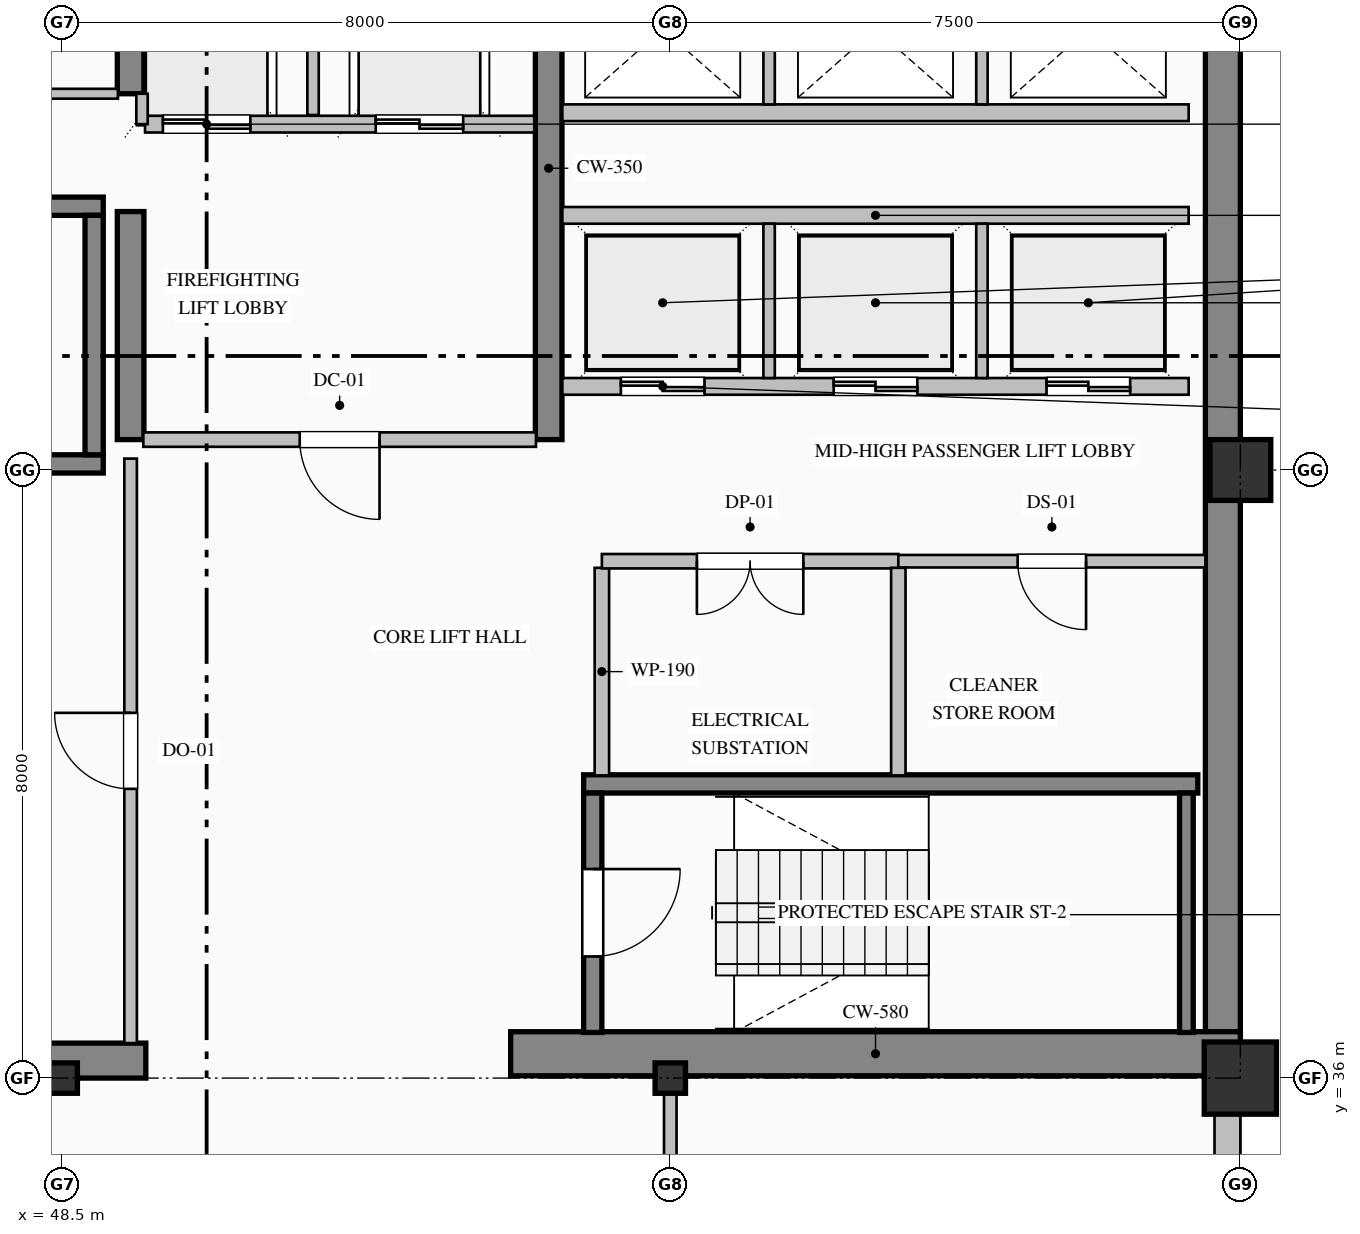
"""IFC4 building model, lengths in metres.
Left out: names, types, materials, properties, quantities, classifications, styles, units other than length and angle.
Written with IfcOpenShell. Run it as: python <this file> out.ifc"""

import sys

from ifc_helpers import new_model, si_unit, direction, frame, frame_2d, origin, origin_2d, place, context, subcontext, project, spatial, rectangle, hollow_rectangle, i_section, extrude, element, fill, save


model = new_model("IFC4")
c1 = context("Model", 3, precision=1e-05, world=origin(), true_north=direction((0.0, 1.0)))
c2 = subcontext(c1, "Body", "Model", "MODEL_VIEW")
j1 = project(units=[si_unit("LENGTHUNIT", "METRE"), si_unit("PLANEANGLEUNIT", "RADIAN")], contexts=[c1])
p1 = place(None, origin())
s1 = spatial("IfcSite", under=j1, at=p1, CompositionType="ELEMENT")
p2 = place(p1, origin())
s2 = spatial("IfcBuilding", under=s1, at=p2, CompositionType="ELEMENT")
p3 = place(p2, frame((0.0, 0.0, 265.8)))
s3 = spatial("IfcBuildingStorey", under=s2, at=p3, CompositionType="ELEMENT", Elevation=265.8)
p4 = place(p3, frame((63.77, 36.32, 0.0), z_axis=(0.0, 0.0, 1.0), x_axis=(0.0, 1.0, 0.0)))
e1 = element("IfcWall", 1, at=p4, inside=s3, PredefinedType="SHEAR", context=c2, shape_type="SweptSolid", body=[
    extrude(rectangle(XDim=15.22, YDim=0.46, at=frame_2d((7.61, 0.0))), origin(), (0.0, 0.0, 1.0), 3.775),
])
p5 = place(p3, frame((40.5, 36.23, 0.0), z_axis=(0.0, 0.0, 1.0), x_axis=(1.0, 0.0, 0.0)))
e2 = element("IfcWall", 2, at=p5, inside=s3, PredefinedType="SHEAR", context=c2, shape_type="SweptSolid", body=[
    extrude(rectangle(XDim=9.1, YDim=0.46, at=frame_2d((4.55, 0.0))), origin(), (0.0, 0.0, 1.0), 3.775),
])
p6 = place(p3, frame((54.4, 36.32, 0.0), z_axis=(0.0, 0.0, 1.0), x_axis=(1.0, 0.0, 0.0)))
e3 = element("IfcWall", 3, at=p6, inside=s3, PredefinedType="SHEAR", context=c2, shape_type="SweptSolid", body=[
    extrude(rectangle(XDim=9.6, YDim=0.58, at=frame_2d((4.8, 0.0))), origin(), (0.0, 0.0, 1.0), 4.0),
])
p7 = place(p3, frame((49.4, 44.4, 0.0), z_axis=(0.0, 0.0, 1.0), x_axis=(0.0, 1.0, 0.0)))
e4 = element("IfcWall", 4, at=p7, inside=s3, PredefinedType="SHEAR", context=c2, shape_type="SweptSolid", body=[
    extrude(rectangle(XDim=3.0, YDim=0.35, at=frame_2d((1.5, 0.0))), origin(), (0.0, 0.0, 1.0), 3.775),
])
p8 = place(p3, frame((49.4, 48.95, 0.0), z_axis=(0.0, 0.0, 1.0), x_axis=(0.0, 1.0, 0.0)))
e5 = element("IfcWall", 5, at=p8, inside=s3, PredefinedType="SHEAR", context=c2, shape_type="SweptSolid", body=[
    extrude(rectangle(XDim=2.59, YDim=0.35, at=frame_2d((1.295, 0.0))), origin(), (0.0, 0.0, 1.0), 3.775),
])
p9 = place(p3, frame((54.9, 44.4, 0.0), z_axis=(0.0, 0.0, 1.0), x_axis=(0.0, 1.0, 0.0)))
e6 = element("IfcWall", 6, at=p9, inside=s3, PredefinedType="SHEAR", context=c2, shape_type="SweptSolid", body=[
    extrude(rectangle(XDim=7.14, YDim=0.35, at=frame_2d((3.57, 0.0))), origin(), (0.0, 0.0, 1.0), 3.775),
])
for number, where, z_axis, x_axis in (
    (7, (48.5, 36.0, 0.0), (0.0, 0.0, 1.0), (1.0, 0.0, 0.0)),
    (8, (56.5, 36.0, 0.0), (0.0, 0.0, 1.0), (1.0, 0.0, 0.0)),
):
    element("IfcColumn", number, at=place(p3, frame(where, z_axis=z_axis, x_axis=x_axis)), inside=s3, PredefinedType="COLUMN", context=c2, shape_type="SweptSolid", body=[
        extrude(i_section(OverallWidth=0.4, OverallDepth=0.4, WebThickness=0.013, FlangeThickness=0.021, FilletRadius=0.022, at=origin_2d()), origin(), (0.0, 0.0, 1.0), 4.0),
    ])
p10 = place(p3, frame((64.0, 36.0, 0.0), z_axis=(0.0, 0.0, 1.0), x_axis=(1.0, 0.0, 0.0)))
e9 = element("IfcColumn", 9, at=p10, inside=s3, PredefinedType="COLUMN", context=c2, shape_type="SweptSolid", body=[
    extrude(hollow_rectangle(XDim=0.95, YDim=0.95, WallThickness=0.036, at=origin_2d()), origin(), (0.0, 0.0, 1.0), 4.0),
])
p11 = place(p3, frame((64.0, 44.0, 0.0), z_axis=(0.0, 0.0, 1.0), x_axis=(1.0, 0.0, 0.0)))
e10 = element("IfcColumn", 10, at=p11, inside=s3, PredefinedType="COLUMN", context=c2, shape_type="SweptSolid", body=[
    extrude(hollow_rectangle(XDim=0.8, YDim=0.8, WallThickness=0.032, at=origin_2d()), origin(), (0.0, 0.0, 1.0), 4.0),
])
p12 = place(p3, frame((63.83, 36.05, 0.0), z_axis=(0.0, 0.0, 1.0), x_axis=(0.0, -1.0, 0.0)))
e11 = element("IfcWall", 11, at=p12, inside=s3, PredefinedType="SOLIDWALL", context=c2, shape_type="SweptSolid", body=[
    extrude(rectangle(XDim=19.55, YDim=0.34, at=frame_2d((9.775, 0.0))), origin(), (0.0, 0.0, 1.0), 3.325),
])
p13 = place(p12, frame((2.925, 0.0, 0.9)))
e12 = element("IfcOpeningElement", 12, at=p13, cuts=e11, PredefinedType="OPENING", context=c2, shape_type="SweptSolid", body=[
    extrude(rectangle(XDim=1.35, YDim=1.85, at=frame_2d((0.675, 0.925))), frame((0.0, 0.18, 0.0), z_axis=(0.0, -1.0, 0.0), x_axis=(1.0, 0.0, 0.0)), (0.0, 0.0, 1.0), 0.36),
])
p14 = place(p12, frame((10.2, 0.0, 0.9)))
e13 = element("IfcOpeningElement", 13, at=p14, cuts=e11, PredefinedType="OPENING", context=c2, shape_type="SweptSolid", body=[
    extrude(rectangle(XDim=1.2, YDim=1.85, at=frame_2d((0.6, 0.925))), frame((0.0, 0.18, 0.0), z_axis=(0.0, -1.0, 0.0), x_axis=(1.0, 0.0, 0.0)), (0.0, 0.0, 1.0), 0.36),
])
p15 = place(p12, frame((13.725, 0.0, 0.9)))
e14 = element("IfcOpeningElement", 14, at=p15, cuts=e11, PredefinedType="OPENING", context=c2, shape_type="SweptSolid", body=[
    extrude(rectangle(XDim=1.35, YDim=1.85, at=frame_2d((0.675, 0.925))), frame((0.0, 0.18, 0.0), z_axis=(0.0, -1.0, 0.0), x_axis=(1.0, 0.0, 0.0)), (0.0, 0.0, 1.0), 0.36),
])
for number, where, z_axis, x_axis in (
    (15, (40.96, 47.47, 0.0), (0.0, 0.0, 1.0), (1.0, 0.0, 0.0)),
    (16, (49.04, 44.08, 0.0), (0.0, 0.0, 1.0), (-1.0, 0.0, 0.0)),
):
    element("IfcWall", number, at=place(p3, frame(where, z_axis=z_axis, x_axis=x_axis)), inside=s3, PredefinedType="SOLIDWALL", context=c2, shape_type="SweptSolid", body=[
        extrude(rectangle(XDim=8.08, YDim=0.24, at=frame_2d((4.04, 0.0))), origin(), (0.0, 0.0, 1.0), 4.0),
    ])
p16 = place(p3, frame((48.92, 44.2, 0.0), z_axis=(0.0, 0.0, 1.0), x_axis=(0.0, 1.0, 0.0)))
e17 = element("IfcWall", 17, at=p16, inside=s3, PredefinedType="SOLIDWALL", context=c2, shape_type="SweptSolid", body=[
    extrude(rectangle(XDim=3.15, YDim=0.24, at=frame_2d((1.575, 0.0))), origin(), (0.0, 0.0, 1.0), 4.0),
])
p17 = place(p3, frame((55.36, 39.87, 0.0), z_axis=(0.0, 0.0, 1.0), x_axis=(1.0, 0.0, 0.0)))
e18 = element("IfcWall", 18, at=p17, inside=s3, PredefinedType="SOLIDWALL", context=c2, shape_type="SweptSolid", body=[
    extrude(rectangle(XDim=8.08, YDim=0.24, at=frame_2d((4.04, 0.0))), origin(), (0.0, 0.0, 1.0), 4.0),
])
p18 = place(p3, frame((55.48, 39.75, 0.0), z_axis=(0.0, 0.0, 1.0), x_axis=(0.0, -1.0, 0.0)))
e19 = element("IfcWall", 19, at=p18, inside=s3, PredefinedType="SOLIDWALL", context=c2, shape_type="SweptSolid", body=[
    extrude(rectangle(XDim=3.15, YDim=0.24, at=frame_2d((1.575, 0.0))), origin(), (0.0, 0.0, 1.0), 4.0),
])
p19 = place(p18, frame((1.0, 0.0, 0.0)))
e20 = element("IfcOpeningElement", 20, at=p19, cuts=e19, PredefinedType="OPENING", context=c2, shape_type="SweptSolid", body=[
    extrude(rectangle(XDim=1.15, YDim=2.2, at=frame_2d((0.575, 1.1))), frame((0.0, 0.13, 0.0), z_axis=(0.0, -1.0, 0.0), x_axis=(1.0, 0.0, 0.0)), (0.0, 0.0, 1.0), 0.26),
])
p20 = place(p3, frame((63.29, 36.6, 0.0), z_axis=(0.0, 0.0, 1.0), x_axis=(0.0, 1.0, 0.0)))
e21 = element("IfcWall", 21, at=p20, inside=s3, PredefinedType="SOLIDWALL", context=c2, shape_type="SweptSolid", body=[
    extrude(rectangle(XDim=3.15, YDim=0.18, at=frame_2d((1.575, 0.0))), origin(), (0.0, 0.0, 1.0), 4.0),
])
p21 = place(p3, frame((54.71, 48.55, 0.0), z_axis=(0.0, 0.0, 1.0), x_axis=(-1.0, 0.0, 0.0)))
e22 = element("IfcWall", 22, at=p21, inside=s3, PredefinedType="PARTITIONING", context=c2, shape_type="SweptSolid", body=[
    extrude(rectangle(XDim=5.12, YDim=0.22, at=frame_2d((2.56, 0.0))), origin(), (0.0, 0.0, 1.0), 3.775),
])
p22 = place(p21, frame((3.735, 0.0, 0.0)))
e23 = element("IfcOpeningElement", 23, at=p22, cuts=e22, PredefinedType="OPENING", context=c2, shape_type="SweptSolid", body=[
    extrude(rectangle(XDim=1.15, YDim=2.2, at=frame_2d((0.575, 1.1))), frame((0.0, 0.12, 0.0), z_axis=(0.0, -1.0, 0.0), x_axis=(1.0, 0.0, 0.0)), (0.0, 0.0, 1.0), 0.24),
])
p23 = place(p21, frame((0.935, 0.0, 0.0)))
e24 = element("IfcOpeningElement", 24, at=p23, cuts=e22, PredefinedType="OPENING", context=c2, shape_type="SweptSolid", body=[
    extrude(rectangle(XDim=1.15, YDim=2.2, at=frame_2d((0.575, 1.1))), frame((0.0, 0.12, 0.0), z_axis=(0.0, -1.0, 0.0), x_axis=(1.0, 0.0, 0.0)), (0.0, 0.0, 1.0), 0.24),
])
p24 = place(p3, frame((51.8, 48.67, 0.0), z_axis=(0.0, 0.0, 1.0), x_axis=(0.0, 1.0, 0.0)))
e25 = element("IfcWall", 25, at=p24, inside=s3, PredefinedType="PARTITIONING", context=c2, shape_type="SweptSolid", body=[
    extrude(rectangle(XDim=2.87, YDim=0.15, at=frame_2d((1.435, 0.0))), origin(), (0.0, 0.0, 1.0), 3.775),
])
p25 = place(p3, frame((49.55, 48.55, 0.0), z_axis=(0.0, 0.0, 1.0), x_axis=(0.0, 1.0, 0.0)))
e26 = element("IfcWall", 26, at=p25, inside=s3, PredefinedType="PARTITIONING", context=c2, shape_type="SweptSolid", body=[
    extrude(rectangle(XDim=0.4, YDim=0.15, at=frame_2d((0.2, 0.0))), origin(), (0.0, 0.0, 1.0), 3.775),
])
p26 = place(p3, frame((63.32, 45.1, 0.0), z_axis=(0.0, 0.0, 1.0), x_axis=(-1.0, 0.0, 0.0)))
e27 = element("IfcWall", 27, at=p26, inside=s3, PredefinedType="PARTITIONING", context=c2, shape_type="SweptSolid", body=[
    extrude(rectangle(XDim=8.24, YDim=0.22, at=frame_2d((4.12, 0.0))), origin(), (0.0, 0.0, 1.0), 3.775),
])
p27 = place(p26, frame((6.37, 0.0, 0.0)))
e28 = element("IfcOpeningElement", 28, at=p27, cuts=e27, PredefinedType="OPENING", context=c2, shape_type="SweptSolid", body=[
    extrude(rectangle(XDim=1.1, YDim=2.2, at=frame_2d((0.55, 1.1))), frame((0.0, 0.12, 0.0), z_axis=(0.0, -1.0, 0.0), x_axis=(1.0, 0.0, 0.0)), (0.0, 0.0, 1.0), 0.24),
])
p28 = place(p26, frame((3.57, 0.0, 0.0)))
e29 = element("IfcOpeningElement", 29, at=p28, cuts=e27, PredefinedType="OPENING", context=c2, shape_type="SweptSolid", body=[
    extrude(rectangle(XDim=1.1, YDim=2.2, at=frame_2d((0.55, 1.1))), frame((0.0, 0.12, 0.0), z_axis=(0.0, -1.0, 0.0), x_axis=(1.0, 0.0, 0.0)), (0.0, 0.0, 1.0), 0.24),
])
p29 = place(p26, frame((0.77, 0.0, 0.0)))
e30 = element("IfcOpeningElement", 30, at=p29, cuts=e27, PredefinedType="OPENING", context=c2, shape_type="SweptSolid", body=[
    extrude(rectangle(XDim=1.1, YDim=2.2, at=frame_2d((0.55, 1.1))), frame((0.0, 0.12, 0.0), z_axis=(0.0, -1.0, 0.0), x_axis=(1.0, 0.0, 0.0)), (0.0, 0.0, 1.0), 0.24),
])
p30 = place(p3, frame((55.08, 47.35, 0.0), z_axis=(0.0, 0.0, 1.0), x_axis=(1.0, 0.0, 0.0)))
e31 = element("IfcWall", 31, at=p30, inside=s3, PredefinedType="PARTITIONING", context=c2, shape_type="SweptSolid", body=[
    extrude(rectangle(XDim=8.24, YDim=0.22, at=frame_2d((4.12, 0.0))), origin(), (0.0, 0.0, 1.0), 3.775),
])
for number, where, z_axis, x_axis in (
    (32, (57.8, 45.21, 0.0), (0.0, 0.0, 1.0), (0.0, 1.0, 0.0)),
    (33, (60.6, 45.21, 0.0), (0.0, 0.0, 1.0), (0.0, 1.0, 0.0)),
):
    element("IfcWall", number, at=place(p3, frame(where, z_axis=z_axis, x_axis=x_axis)), inside=s3, PredefinedType="PARTITIONING", context=c2, shape_type="SweptSolid", body=[
        extrude(rectangle(XDim=2.03, YDim=0.15, at=frame_2d((1.015, 0.0))), origin(), (0.0, 0.0, 1.0), 3.775),
    ])
p31 = place(p3, frame((63.32, 48.7, 0.0), z_axis=(0.0, 0.0, 1.0), x_axis=(-1.0, 0.0, 0.0)))
e34 = element("IfcWall", 34, at=p31, inside=s3, PredefinedType="PARTITIONING", context=c2, shape_type="SweptSolid", body=[
    extrude(rectangle(XDim=8.24, YDim=0.22, at=frame_2d((4.12, 0.0))), origin(), (0.0, 0.0, 1.0), 3.775),
])
for number, where, z_axis, x_axis in (
    (35, (57.8, 48.81, 0.0), (0.0, 0.0, 1.0), (0.0, 1.0, 0.0)),
    (36, (60.6, 48.81, 0.0), (0.0, 0.0, 1.0), (0.0, 1.0, 0.0)),
):
    element("IfcWall", number, at=place(p3, frame(where, z_axis=z_axis, x_axis=x_axis)), inside=s3, PredefinedType="PARTITIONING", context=c2, shape_type="SweptSolid", body=[
        extrude(rectangle(XDim=2.73, YDim=0.15, at=frame_2d((1.365, 0.0))), origin(), (0.0, 0.0, 1.0), 3.775),
    ])
p32 = place(p3, frame((45.2, 48.95, 0.0), z_axis=(0.0, 0.0, 1.0), x_axis=(1.0, 0.0, 0.0)))
e37 = element("IfcWall", 37, at=p32, inside=s3, PredefinedType="PARTITIONING", context=c2, shape_type="SweptSolid", body=[
    extrude(rectangle(XDim=4.033, YDim=0.13, at=frame_2d((2.017, 0.0))), origin(), (0.0, 0.0, 1.0), 3.775),
])
p33 = place(p32, frame((1.556, 0.0, 0.0)))
e38 = element("IfcOpeningElement", 38, at=p33, cuts=e37, PredefinedType="OPENING", context=c2, shape_type="SweptSolid", body=[
    extrude(rectangle(XDim=0.92, YDim=2.15, at=frame_2d((0.46, 1.075))), frame((0.0, 0.075, 0.0), z_axis=(0.0, -1.0, 0.0), x_axis=(1.0, 0.0, 0.0)), (0.0, 0.0, 1.0), 0.15),
])
p34 = place(p3, frame((54.733, 44.4, 0.0), z_axis=(0.0, 0.0, 1.0), x_axis=(-1.0, 0.0, 0.0)))
e39 = element("IfcWall", 39, at=p34, inside=s3, PredefinedType="PARTITIONING", context=c2, shape_type="SweptSolid", body=[
    extrude(rectangle(XDim=5.166, YDim=0.19, at=frame_2d((2.583, 0.0))), origin(), (0.0, 0.0, 1.0), 3.775),
])
p35 = place(p34, frame((2.058, 0.0, 0.0)))
e40 = element("IfcOpeningElement", 40, at=p35, cuts=e39, PredefinedType="OPENING", context=c2, shape_type="SweptSolid", body=[
    extrude(rectangle(XDim=1.05, YDim=2.15, at=frame_2d((0.525, 1.075))), frame((0.0, 0.105, 0.0), z_axis=(0.0, -1.0, 0.0), x_axis=(1.0, 0.0, 0.0)), (0.0, 0.0, 1.0), 0.21),
])
p36 = place(p3, frame((49.4, 36.46, 0.0), z_axis=(0.0, 0.0, 1.0), x_axis=(0.0, 1.0, 0.0)))
e41 = element("IfcWall", 41, at=p36, inside=s3, PredefinedType="PARTITIONING", context=c2, shape_type="SweptSolid", body=[
    extrude(rectangle(XDim=7.69, YDim=0.165, at=frame_2d((3.845, 0.0))), origin(), (0.0, 0.0, 1.0), 3.017),
])
p37 = place(p36, frame((3.345, 0.0, 0.0)))
e42 = element("IfcOpeningElement", 42, at=p37, cuts=e41, PredefinedType="OPENING", context=c2, shape_type="SweptSolid", body=[
    extrude(rectangle(XDim=1.0, YDim=2.15, at=frame_2d((0.5, 1.075))), frame((0.0, 0.093, 0.0), z_axis=(0.0, -1.0, 0.0), x_axis=(1.0, 0.0, 0.0)), (0.0, 0.0, 1.0), 0.185),
])
p38 = place(p3, frame((55.6, 42.713, 0.0), z_axis=(0.0, 0.0, 1.0), x_axis=(0.0, -1.0, 0.0)))
e43 = element("IfcWall", 43, at=p38, inside=s3, PredefinedType="PARTITIONING", context=c2, shape_type="SweptSolid", body=[
    extrude(rectangle(XDim=2.731, YDim=0.19, at=frame_2d((1.365, 0.0))), origin(), (0.0, 0.0, 1.0), 3.775),
])
p39 = place(p3, frame((59.5, 42.8, 0.0), z_axis=(0.0, 0.0, 1.0), x_axis=(-1.0, 0.0, 0.0)))
e44 = element("IfcWall", 44, at=p39, inside=s3, PredefinedType="PARTITIONING", context=c2, shape_type="SweptSolid", body=[
    extrude(rectangle(XDim=3.9, YDim=0.19, at=frame_2d((1.95, 0.0))), origin(), (0.0, 0.0, 1.0), 3.775),
])
p40 = place(p39, frame((1.25, 0.0, 0.0)))
e45 = element("IfcOpeningElement", 45, at=p40, cuts=e44, PredefinedType="OPENING", context=c2, shape_type="SweptSolid", body=[
    extrude(rectangle(XDim=1.4, YDim=2.25, at=frame_2d((0.7, 1.125))), frame((0.0, 0.105, 0.0), z_axis=(0.0, -1.0, 0.0), x_axis=(1.0, 0.0, 0.0)), (0.0, 0.0, 1.0), 0.21),
])
p41 = place(p3, frame((63.54, 42.8, 0.0), z_axis=(0.0, 0.0, 1.0), x_axis=(-1.0, 0.0, 0.0)))
e46 = element("IfcWall", 46, at=p41, inside=s3, PredefinedType="PARTITIONING", context=c2, shape_type="SweptSolid", body=[
    extrude(rectangle(XDim=4.04, YDim=0.165, at=frame_2d((2.02, 0.0))), origin(), (0.0, 0.0, 1.0), 3.775),
])
p42 = place(p41, frame((1.57, 0.0, 0.0)))
e47 = element("IfcOpeningElement", 47, at=p42, cuts=e46, PredefinedType="OPENING", context=c2, shape_type="SweptSolid", body=[
    extrude(rectangle(XDim=0.9, YDim=2.15, at=frame_2d((0.45, 1.075))), frame((0.0, 0.093, 0.0), z_axis=(0.0, -1.0, 0.0), x_axis=(1.0, 0.0, 0.0)), (0.0, 0.0, 1.0), 0.185),
])
p43 = place(p3, frame((59.5, 42.713, 0.0), z_axis=(0.0, 0.0, 1.0), x_axis=(0.0, -1.0, 0.0)))
e48 = element("IfcWall", 48, at=p43, inside=s3, PredefinedType="PARTITIONING", context=c2, shape_type="SweptSolid", body=[
    extrude(rectangle(XDim=2.731, YDim=0.19, at=frame_2d((1.365, 0.0))), origin(), (0.0, 0.0, 1.0), 3.775),
])
p44 = place(p3, frame((56.5, 36.0, 0.0), z_axis=(0.0, 0.0, 1.0), x_axis=(0.0, -1.0, 0.0)))
e49 = element("IfcWall", 49, at=p44, inside=s3, PredefinedType="PARTITIONING", context=c2, shape_type="SweptSolid", body=[
    extrude(rectangle(XDim=5.525, YDim=0.165, at=frame_2d((2.763, 0.0))), origin(), (0.0, 0.0, 1.0), 3.179),
])
p45 = place(p19, origin())
e50 = element("IfcDoor", 50, at=p45, inside=s3, OperationType="SINGLE_SWING_LEFT", PredefinedType="DOOR", context=c2, shape_type="SweptSolid", body=[
    extrude(rectangle(XDim=1.15, YDim=2.2, at=frame_2d((0.575, 1.1))), frame((0.0, 0.025, 0.0), z_axis=(0.0, -1.0, 0.0), x_axis=(1.0, 0.0, 0.0)), (0.0, 0.0, 1.0), 0.05),
])
fill(e20, e50)
p46 = place(p22, origin())
e51 = element("IfcDoor", 51, at=p46, inside=s3, OperationType="DOUBLE_DOOR_SLIDING", PredefinedType="DOOR", context=c2, shape_type="SweptSolid", body=[
    extrude(rectangle(XDim=1.15, YDim=2.2, at=frame_2d((0.575, 1.1))), frame((0.0, 0.025, 0.0), z_axis=(0.0, -1.0, 0.0), x_axis=(1.0, 0.0, 0.0)), (0.0, 0.0, 1.0), 0.05),
])
fill(e23, e51)
p47 = place(p23, origin())
e52 = element("IfcDoor", 52, at=p47, inside=s3, OperationType="DOUBLE_DOOR_SLIDING", PredefinedType="DOOR", context=c2, shape_type="SweptSolid", body=[
    extrude(rectangle(XDim=1.15, YDim=2.2, at=frame_2d((0.575, 1.1))), frame((0.0, 0.025, 0.0), z_axis=(0.0, -1.0, 0.0), x_axis=(1.0, 0.0, 0.0)), (0.0, 0.0, 1.0), 0.05),
])
fill(e24, e52)
p48 = place(p27, origin())
e53 = element("IfcDoor", 53, at=p48, inside=s3, OperationType="DOUBLE_DOOR_SLIDING", PredefinedType="DOOR", context=c2, shape_type="SweptSolid", body=[
    extrude(rectangle(XDim=1.1, YDim=2.2, at=frame_2d((0.55, 1.1))), frame((0.0, 0.025, 0.0), z_axis=(0.0, -1.0, 0.0), x_axis=(1.0, 0.0, 0.0)), (0.0, 0.0, 1.0), 0.05),
])
fill(e28, e53)
p49 = place(p28, origin())
e54 = element("IfcDoor", 54, at=p49, inside=s3, OperationType="DOUBLE_DOOR_SLIDING", PredefinedType="DOOR", context=c2, shape_type="SweptSolid", body=[
    extrude(rectangle(XDim=1.1, YDim=2.2, at=frame_2d((0.55, 1.1))), frame((0.0, 0.025, 0.0), z_axis=(0.0, -1.0, 0.0), x_axis=(1.0, 0.0, 0.0)), (0.0, 0.0, 1.0), 0.05),
])
fill(e29, e54)
p50 = place(p29, origin())
e55 = element("IfcDoor", 55, at=p50, inside=s3, OperationType="DOUBLE_DOOR_SLIDING", PredefinedType="DOOR", context=c2, shape_type="SweptSolid", body=[
    extrude(rectangle(XDim=1.1, YDim=2.2, at=frame_2d((0.55, 1.1))), frame((0.0, 0.025, 0.0), z_axis=(0.0, -1.0, 0.0), x_axis=(1.0, 0.0, 0.0)), (0.0, 0.0, 1.0), 0.05),
])
fill(e30, e55)
p51 = place(p35, origin())
e56 = element("IfcDoor", 56, at=p51, inside=s3, OperationType="SINGLE_SWING_LEFT", PredefinedType="DOOR", context=c2, shape_type="SweptSolid", body=[
    extrude(rectangle(XDim=1.05, YDim=2.15, at=frame_2d((0.525, 1.075))), frame((0.0, 0.025, 0.0), z_axis=(0.0, -1.0, 0.0), x_axis=(1.0, 0.0, 0.0)), (0.0, 0.0, 1.0), 0.05),
])
fill(e40, e56)
p52 = place(p37, origin())
e57 = element("IfcDoor", 57, at=p52, inside=s3, OperationType="SINGLE_SWING_RIGHT", PredefinedType="DOOR", context=c2, shape_type="SweptSolid", body=[
    extrude(rectangle(XDim=1.0, YDim=2.15, at=frame_2d((0.5, 1.075))), frame((0.0, 0.025, 0.0), z_axis=(0.0, -1.0, 0.0), x_axis=(1.0, 0.0, 0.0)), (0.0, 0.0, 1.0), 0.05),
])
fill(e42, e57)
p53 = place(p40, origin())
e58 = element("IfcDoor", 58, at=p53, inside=s3, OperationType="DOUBLE_DOOR_SINGLE_SWING", PredefinedType="DOOR", context=c2, shape_type="SweptSolid", body=[
    extrude(rectangle(XDim=1.4, YDim=2.25, at=frame_2d((0.7, 1.125))), frame((0.0, 0.025, 0.0), z_axis=(0.0, -1.0, 0.0), x_axis=(1.0, 0.0, 0.0)), (0.0, 0.0, 1.0), 0.05),
])
fill(e45, e58)
p54 = place(p42, origin())
e59 = element("IfcDoor", 59, at=p54, inside=s3, OperationType="SINGLE_SWING_LEFT", PredefinedType="DOOR", context=c2, shape_type="SweptSolid", body=[
    extrude(rectangle(XDim=0.9, YDim=2.15, at=frame_2d((0.45, 1.075))), frame((0.0, 0.025, 0.0), z_axis=(0.0, -1.0, 0.0), x_axis=(1.0, 0.0, 0.0)), (0.0, 0.0, 1.0), 0.05),
])
fill(e47, e59)
save(model, sys.argv[1])
